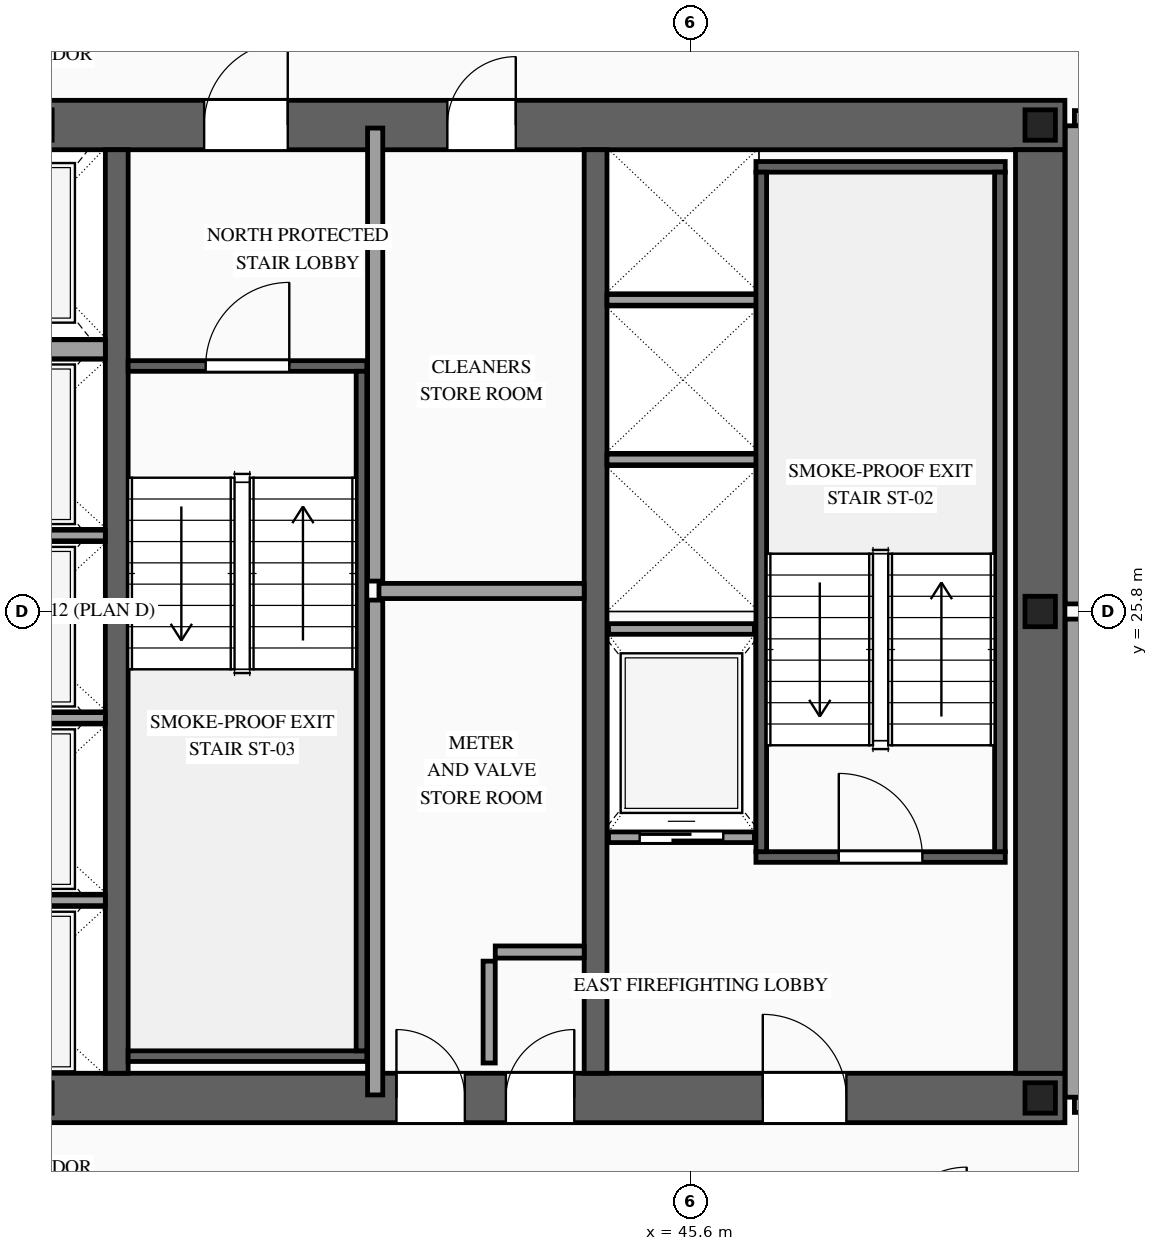
"""IFC4 building model, lengths in metres.
Left out: names, types, materials, properties, quantities, classifications, styles, units other than length and angle.
Written with IfcOpenShell. Run it as: python <this file> out.ifc"""

import sys

from ifc_helpers import new_model, si_unit, direction, frame, frame_2d, origin, origin_2d, place, context, subcontext, project, spatial, rectangle, i_section, extrude, source, transform, mapped, element, fill, save


model = new_model("IFC4")
c1 = context("Model", 3, precision=1e-05, world=origin(), true_north=direction((0.0, 1.0)))
c2 = subcontext(c1, "Body", "Model", "MODEL_VIEW")
j1 = project(units=[si_unit("LENGTHUNIT", "METRE"), si_unit("PLANEANGLEUNIT", "RADIAN")], contexts=[c1])
p1 = place(None, origin())
s1 = spatial("IfcSite", under=j1, at=p1, CompositionType="ELEMENT")
p2 = place(p1, origin())
s2 = spatial("IfcBuilding", under=s1, at=p2, CompositionType="ELEMENT")
p3 = place(p2, frame((0.0, 0.0, 216.0)))
s3 = spatial("IfcBuildingStorey", under=s2, at=p3, CompositionType="ELEMENT", Elevation=216.0)
p4 = place(p3, frame((23.475, 19.4, 0.0), z_axis=(0.0, 0.0, 1.0), x_axis=(1.0, 0.0, 0.0)))
e1 = element("IfcWall", 1, at=p4, inside=s3, PredefinedType="SHEAR", context=c2, shape_type="SweptSolid", body=[
    extrude(rectangle(XDim=27.05, YDim=0.65, at=frame_2d((13.525, 0.0))), origin(), (0.0, 0.0, 1.0), 3.5),
])
p5 = place(p4, frame((1.975, 0.0, 0.0)))
e2 = element("IfcOpeningElement", 2, at=p5, cuts=e1, PredefinedType="OPENING", context=c2, shape_type="SweptSolid", body=[
    extrude(rectangle(XDim=1.1, YDim=2.2, at=frame_2d((0.55, 1.1))), frame((0.0, 0.34, 0.0), z_axis=(0.0, -1.0, 0.0), x_axis=(1.0, 0.0, 0.0)), (0.0, 0.0, 1.0), 0.68),
])
p6 = place(p4, frame((9.875, 0.0, 0.0)))
e3 = element("IfcOpeningElement", 3, at=p6, cuts=e1, PredefinedType="OPENING", context=c2, shape_type="SweptSolid", body=[
    extrude(rectangle(XDim=1.1, YDim=2.2, at=frame_2d((0.55, 1.1))), frame((0.0, 0.34, 0.0), z_axis=(0.0, -1.0, 0.0), x_axis=(1.0, 0.0, 0.0)), (0.0, 0.0, 1.0), 0.68),
])
p7 = place(p4, frame((23.075, 0.0, 0.0)))
e4 = element("IfcOpeningElement", 4, at=p7, cuts=e1, PredefinedType="OPENING", context=c2, shape_type="SweptSolid", body=[
    extrude(rectangle(XDim=1.1, YDim=2.2, at=frame_2d((0.55, 1.1))), frame((0.0, 0.34, 0.0), z_axis=(0.0, -1.0, 0.0), x_axis=(1.0, 0.0, 0.0)), (0.0, 0.0, 1.0), 0.68),
])
p8 = place(p4, frame((19.695, 0.0, 0.0)))
e5 = element("IfcOpeningElement", 5, at=p8, cuts=e1, PredefinedType="OPENING", context=c2, shape_type="SweptSolid", body=[
    extrude(rectangle(XDim=0.9, YDim=2.15, at=frame_2d((0.45, 1.075))), frame((0.0, 0.34, 0.0), z_axis=(0.0, -1.0, 0.0), x_axis=(1.0, 0.0, 0.0)), (0.0, 0.0, 1.0), 0.68),
])
p9 = place(p4, frame((18.255, 0.0, 0.0)))
e6 = element("IfcOpeningElement", 6, at=p9, cuts=e1, PredefinedType="OPENING", context=c2, shape_type="SweptSolid", body=[
    extrude(rectangle(XDim=0.9, YDim=2.15, at=frame_2d((0.45, 1.075))), frame((0.0, 0.34, 0.0), z_axis=(0.0, -1.0, 0.0), x_axis=(1.0, 0.0, 0.0)), (0.0, 0.0, 1.0), 0.68),
])
p10 = place(p3, frame((23.475, 32.2, 0.0), z_axis=(0.0, 0.0, 1.0), x_axis=(1.0, 0.0, 0.0)))
e7 = element("IfcWall", 7, at=p10, inside=s3, PredefinedType="SHEAR", context=c2, shape_type="SweptSolid", body=[
    extrude(rectangle(XDim=27.05, YDim=0.65, at=frame_2d((13.525, 0.0))), origin(), (0.0, 0.0, 1.0), 3.5),
])
p11 = place(p10, frame((4.595, 0.0, 0.0)))
e8 = element("IfcOpeningElement", 8, at=p11, cuts=e7, PredefinedType="OPENING", context=c2, shape_type="SweptSolid", body=[
    extrude(rectangle(XDim=0.9, YDim=2.15, at=frame_2d((0.45, 1.075))), frame((0.0, 0.34, 0.0), z_axis=(0.0, -1.0, 0.0), x_axis=(1.0, 0.0, 0.0)), (0.0, 0.0, 1.0), 0.68),
])
p12 = place(p10, frame((9.875, 0.0, 0.0)))
e9 = element("IfcOpeningElement", 9, at=p12, cuts=e7, PredefinedType="OPENING", context=c2, shape_type="SweptSolid", body=[
    extrude(rectangle(XDim=1.1, YDim=2.2, at=frame_2d((0.55, 1.1))), frame((0.0, 0.34, 0.0), z_axis=(0.0, -1.0, 0.0), x_axis=(1.0, 0.0, 0.0)), (0.0, 0.0, 1.0), 0.68),
])
p13 = place(p10, frame((15.725, 0.0, 0.0)))
e10 = element("IfcOpeningElement", 10, at=p13, cuts=e7, PredefinedType="OPENING", context=c2, shape_type="SweptSolid", body=[
    extrude(rectangle(XDim=1.1, YDim=2.2, at=frame_2d((0.55, 1.1))), frame((0.0, 0.34, 0.0), z_axis=(0.0, -1.0, 0.0), x_axis=(1.0, 0.0, 0.0)), (0.0, 0.0, 1.0), 0.68),
])
p14 = place(p10, frame((18.925, 0.0, 0.0)))
e11 = element("IfcOpeningElement", 11, at=p14, cuts=e7, PredefinedType="OPENING", context=c2, shape_type="SweptSolid", body=[
    extrude(rectangle(XDim=0.9, YDim=2.15, at=frame_2d((0.45, 1.075))), frame((0.0, 0.34, 0.0), z_axis=(0.0, -1.0, 0.0), x_axis=(1.0, 0.0, 0.0)), (0.0, 0.0, 1.0), 0.68),
])
m1 = source(origin(), c2, "Body", "SweptSolid", [
    extrude(rectangle(XDim=12.15, YDim=0.65, at=frame_2d((6.075, 0.0))), origin(), (0.0, 0.0, 1.0), 3.5),
])
p15 = place(p3, frame((50.2, 19.725, 0.0), z_axis=(0.0, 0.0, 1.0), x_axis=(0.0, 1.0, 0.0)))
e12 = element("IfcWall", 12, at=p15, inside=s3, PredefinedType="SHEAR", context=c2, shape_type="MappedRepresentation", body=[
    mapped(m1, transform((0.0, 0.0, 0.0), scale=1.0)),
])
m2 = source(origin(), c2, "Body", "SweptSolid", [
    extrude(rectangle(XDim=12.15, YDim=0.3, at=frame_2d((6.075, 0.0))), origin(), (0.0, 0.0, 1.0), 3.5),
])
for number, where, z_axis, x_axis in (
    (13, (38.05, 19.725, 0.0), (0.0, 0.0, 1.0), (0.0, 1.0, 0.0)),
    (14, (44.35, 19.725, 0.0), (0.0, 0.0, 1.0), (0.0, 1.0, 0.0)),
):
    element("IfcWall", number, at=place(p3, frame(where, z_axis=z_axis, x_axis=x_axis)), inside=s3, PredefinedType="SOLIDWALL", context=c2, shape_type="MappedRepresentation", body=[
        mapped(m2, transform((0.0, 0.0, 0.0), scale=1.0)),
    ])
m3 = source(origin(), c2, "Body", "SweptSolid", [
    extrude(i_section(OverallWidth=0.4, OverallDepth=0.4, WebThickness=0.013, FlangeThickness=0.021, at=origin_2d()), origin(), (0.0, 0.0, 1.0), 3.5),
])
for number, where, z_axis, x_axis in (
    (15, (50.2, 19.4, 0.0), (0.0, 0.0, 1.0), (1.0, 0.0, 0.0)),
    (16, (50.2, 25.8, 0.0), (0.0, 0.0, 1.0), (1.0, 0.0, 0.0)),
    (17, (50.2, 32.2, 0.0), (0.0, 0.0, 1.0), (1.0, 0.0, 0.0)),
):
    element("IfcColumn", number, at=place(p3, frame(where, z_axis=z_axis, x_axis=x_axis)), inside=s3, PredefinedType="COLUMN", context=c2, shape_type="MappedRepresentation", body=[
        mapped(m3, transform((0.0, 0.0, 0.0), scale=1.0)),
    ])
p16 = place(p3, frame((44.52, 22.83, 0.0), z_axis=(0.0, 0.0, 1.0), x_axis=(1.0, 0.0, 0.0)))
e18 = element("IfcWall", 18, at=p16, inside=s3, PredefinedType="SOLIDWALL", context=c2, shape_type="SweptSolid", body=[
    extrude(rectangle(XDim=1.92, YDim=0.14, at=frame_2d((0.96, 0.0))), origin(), (0.0, 0.0, 1.0), 3.22),
])
p17 = place(p16, frame((0.41, 0.0, 0.0)))
e19 = element("IfcOpeningElement", 19, at=p17, cuts=e18, PredefinedType="OPENING", context=c2, shape_type="SweptSolid", body=[
    extrude(rectangle(XDim=1.1, YDim=2.2, at=frame_2d((0.55, 1.1))), frame((0.0, 0.085, 0.0), z_axis=(0.0, -1.0, 0.0), x_axis=(1.0, 0.0, 0.0)), (0.0, 0.0, 1.0), 0.17),
])
m4 = source(origin(), c2, "Body", "SweptSolid", [
    extrude(rectangle(XDim=1.92, YDim=0.14, at=frame_2d((0.96, 0.0))), origin(), (0.0, 0.0, 1.0), 3.22),
])
p18 = place(p3, frame((44.52, 25.57, 0.0), z_axis=(0.0, 0.0, 1.0), x_axis=(1.0, 0.0, 0.0)))
e20 = element("IfcWall", 20, at=p18, inside=s3, PredefinedType="SOLIDWALL", context=c2, shape_type="MappedRepresentation", body=[
    mapped(m4, transform((0.0, 0.0, 0.0), scale=1.0)),
])
m5 = source(origin(), c2, "Body", "SweptSolid", [
    extrude(rectangle(XDim=2.4, YDim=0.14, at=frame_2d((1.2, 0.0))), origin(), (0.0, 0.0, 1.0), 3.22),
])
for number, where, z_axis, x_axis in (
    (21, (35.5, 22.0, 0.0), (0.0, 0.0, 1.0), (1.0, 0.0, 0.0)),
    (22, (35.5, 24.4, 0.0), (0.0, 0.0, 1.0), (1.0, 0.0, 0.0)),
    (23, (35.5, 26.8, 0.0), (0.0, 0.0, 1.0), (1.0, 0.0, 0.0)),
):
    element("IfcWall", number, at=place(p3, frame(where, z_axis=z_axis, x_axis=x_axis)), inside=s3, PredefinedType="SOLIDWALL", context=c2, shape_type="MappedRepresentation", body=[
        mapped(m5, transform((0.0, 0.0, 0.0), scale=1.0)),
    ])
m6 = source(origin(), c2, "Body", "SweptSolid", [
    extrude(rectangle(XDim=2.4, YDim=0.25, at=frame_2d((1.2, 0.0))), origin(), (0.0, 0.0, 1.0), 3.22),
])
p19 = place(p3, frame((35.5, 29.25, 0.0), z_axis=(0.0, 0.0, 1.0), x_axis=(1.0, 0.0, 0.0)))
e24 = element("IfcWall", 24, at=p19, inside=s3, PredefinedType="SOLIDWALL", context=c2, shape_type="MappedRepresentation", body=[
    mapped(m6, transform((0.0, 0.0, 0.0), scale=1.0)),
])
m7 = source(origin(), c2, "Body", "SweptSolid", [
    extrude(rectangle(XDim=2.0, YDim=0.14, at=frame_2d((1.0, 0.0))), origin(), (0.0, 0.0, 1.0), 3.22),
])
for number, where, z_axis, x_axis in (
    (25, (44.5, 27.8, 0.0), (0.0, 0.0, 1.0), (1.0, 0.0, 0.0)),
    (26, (44.5, 29.9, 0.0), (0.0, 0.0, 1.0), (1.0, 0.0, 0.0)),
):
    element("IfcWall", number, at=place(p3, frame(where, z_axis=z_axis, x_axis=x_axis)), inside=s3, PredefinedType="SOLIDWALL", context=c2, shape_type="MappedRepresentation", body=[
        mapped(m7, transform((0.0, 0.0, 0.0), scale=1.0)),
    ])
p20 = place(p3, frame((46.46, 22.57, 0.0), z_axis=(0.0, 0.0, 1.0), x_axis=(1.0, 0.0, 0.0)))
e27 = element("IfcWall", 27, at=p20, inside=s3, PredefinedType="SOLIDWALL", context=c2, shape_type="SweptSolid", body=[
    extrude(rectangle(XDim=3.28, YDim=0.14, at=frame_2d((1.64, 0.0))), origin(), (0.0, 0.0, 1.0), 3.22),
])
p21 = place(p20, frame((1.09, 0.0, 0.0)))
e28 = element("IfcOpeningElement", 28, at=p21, cuts=e27, PredefinedType="OPENING", context=c2, shape_type="SweptSolid", body=[
    extrude(rectangle(XDim=1.1, YDim=2.2, at=frame_2d((0.55, 1.1))), frame((0.0, 0.085, 0.0), z_axis=(0.0, -1.0, 0.0), x_axis=(1.0, 0.0, 0.0)), (0.0, 0.0, 1.0), 0.17),
])
m8 = source(origin(), c2, "Body", "SweptSolid", [
    extrude(rectangle(XDim=3.28, YDim=0.14, at=frame_2d((1.64, 0.0))), origin(), (0.0, 0.0, 1.0), 3.22),
])
p22 = place(p3, frame((46.46, 31.65, 0.0), z_axis=(0.0, 0.0, 1.0), x_axis=(1.0, 0.0, 0.0)))
e29 = element("IfcWall", 29, at=p22, inside=s3, PredefinedType="SOLIDWALL", context=c2, shape_type="MappedRepresentation", body=[
    mapped(m8, transform((0.0, 0.0, 0.0), scale=1.0)),
])
m9 = source(origin(), c2, "Body", "SweptSolid", [
    extrude(rectangle(XDim=8.94, YDim=0.14, at=frame_2d((4.47, 0.0))), origin(), (0.0, 0.0, 1.0), 3.22),
])
for number, where, z_axis, x_axis in (
    (30, (46.53, 22.64, 0.0), (0.0, 0.0, 1.0), (0.0, 1.0, 0.0)),
    (31, (49.67, 22.64, 0.0), (0.0, 0.0, 1.0), (0.0, 1.0, 0.0)),
):
    element("IfcWall", number, at=place(p3, frame(where, z_axis=z_axis, x_axis=x_axis)), inside=s3, PredefinedType="SOLIDWALL", context=c2, shape_type="MappedRepresentation", body=[
        mapped(m9, transform((0.0, 0.0, 0.0), scale=1.0)),
    ])
p23 = place(p3, frame((38.2, 29.03, 0.0), z_axis=(0.0, 0.0, 1.0), x_axis=(1.0, 0.0, 0.0)))
e32 = element("IfcWall", 32, at=p23, inside=s3, PredefinedType="SOLIDWALL", context=c2, shape_type="SweptSolid", body=[
    extrude(rectangle(XDim=3.14, YDim=0.14, at=frame_2d((1.57, 0.0))), origin(), (0.0, 0.0, 1.0), 3.22),
])
p24 = place(p23, frame((1.02, 0.0, 0.0)))
e33 = element("IfcOpeningElement", 33, at=p24, cuts=e32, PredefinedType="OPENING", context=c2, shape_type="SweptSolid", body=[
    extrude(rectangle(XDim=1.1, YDim=2.2, at=frame_2d((0.55, 1.1))), frame((0.0, 0.085, 0.0), z_axis=(0.0, -1.0, 0.0), x_axis=(1.0, 0.0, 0.0)), (0.0, 0.0, 1.0), 0.17),
])
m10 = source(origin(), c2, "Body", "SweptSolid", [
    extrude(rectangle(XDim=3.14, YDim=0.14, at=frame_2d((1.57, 0.0))), origin(), (0.0, 0.0, 1.0), 3.22),
])
p25 = place(p3, frame((38.2, 19.95, 0.0), z_axis=(0.0, 0.0, 1.0), x_axis=(1.0, 0.0, 0.0)))
e34 = element("IfcWall", 34, at=p25, inside=s3, PredefinedType="SOLIDWALL", context=c2, shape_type="MappedRepresentation", body=[
    mapped(m10, transform((0.0, 0.0, 0.0), scale=1.0)),
])
m11 = source(origin(), c2, "Body", "SweptSolid", [
    extrude(rectangle(XDim=8.94, YDim=0.14, at=frame_2d((4.47, 0.0))), origin(), (0.0, 0.0, 1.0), 3.22),
])
p26 = place(p3, frame((41.27, 20.02, 0.0), z_axis=(0.0, 0.0, 1.0), x_axis=(0.0, 1.0, 0.0)))
e35 = element("IfcWall", 35, at=p26, inside=s3, PredefinedType="SOLIDWALL", context=c2, shape_type="MappedRepresentation", body=[
    mapped(m11, transform((0.0, 0.0, 0.0), scale=1.0)),
])
m12 = source(origin(), c2, "Body", "SweptSolid", [
    extrude(rectangle(XDim=1.34, YDim=0.16, at=frame_2d((0.67, 0.0))), origin(), (0.0, 0.0, 1.0), 3.22),
])
p27 = place(p3, frame((42.95, 19.86, 0.0), z_axis=(0.0, 0.0, 1.0), x_axis=(0.0, 1.0, 0.0)))
e36 = element("IfcWall", 36, at=p27, inside=s3, PredefinedType="PARTITIONING", context=c2, shape_type="MappedRepresentation", body=[
    mapped(m12, transform((0.0, 0.0, 0.0), scale=1.0)),
])
m13 = source(origin(), c2, "Body", "SweptSolid", [
    extrude(rectangle(XDim=1.17, YDim=0.16, at=frame_2d((0.585, 0.0))), origin(), (0.0, 0.0, 1.0), 3.22),
])
p28 = place(p3, frame((43.03, 21.32, 0.0), z_axis=(0.0, 0.0, 1.0), x_axis=(1.0, 0.0, 0.0)))
e37 = element("IfcWall", 37, at=p28, inside=s3, PredefinedType="PARTITIONING", context=c2, shape_type="MappedRepresentation", body=[
    mapped(m13, transform((0.0, 0.0, 0.0), scale=1.0)),
])
m14 = source(origin(), c2, "Body", "SweptSolid", [
    extrude(rectangle(XDim=6.51, YDim=0.2, at=frame_2d((3.255, 0.0))), origin(), (0.0, 0.0, 1.0), 3.22),
])
p29 = place(p3, frame((41.45, 19.44, 0.0), z_axis=(0.0, 0.0, 1.0), x_axis=(0.0, 1.0, 0.0)))
e38 = element("IfcWall", 38, at=p29, inside=s3, PredefinedType="PARTITIONING", context=c2, shape_type="MappedRepresentation", body=[
    mapped(m14, transform((0.0, 0.0, 0.0), scale=1.0)),
])
m15 = source(origin(), c2, "Body", "SweptSolid", [
    extrude(rectangle(XDim=2.7, YDim=0.2, at=frame_2d((1.35, 0.0))), origin(), (0.0, 0.0, 1.0), 3.22),
])
p30 = place(p3, frame((41.5, 26.07, 0.0), z_axis=(0.0, 0.0, 1.0), x_axis=(1.0, 0.0, 0.0)))
e39 = element("IfcWall", 39, at=p30, inside=s3, PredefinedType="PARTITIONING", context=c2, shape_type="MappedRepresentation", body=[
    mapped(m15, transform((0.0, 0.0, 0.0), scale=1.0)),
])
m16 = source(origin(), c2, "Body", "SweptSolid", [
    extrude(rectangle(XDim=5.96, YDim=0.2, at=frame_2d((2.98, 0.0))), origin(), (0.0, 0.0, 1.0), 3.22),
])
p31 = place(p3, frame((41.45, 26.2, 0.0), z_axis=(0.0, 0.0, 1.0), x_axis=(0.0, 1.0, 0.0)))
e40 = element("IfcWall", 40, at=p31, inside=s3, PredefinedType="PARTITIONING", context=c2, shape_type="MappedRepresentation", body=[
    mapped(m16, transform((0.0, 0.0, 0.0), scale=1.0)),
])
p32 = place(p3, frame((50.65, 19.31, 0.0), z_axis=(0.0, 0.0, 1.0), x_axis=(1.0, 0.0, 0.0)))
e41 = element("IfcWall", 41, at=p32, inside=s3, PredefinedType="PARTITIONING", context=c2, shape_type="SweptSolid", body=[
    extrude(rectangle(XDim=8.3, YDim=0.2, at=frame_2d((4.15, 0.0))), origin(), (0.0, 0.0, 1.0), 3.22),
])
p33 = place(p32, frame((3.585, 0.0, 0.0)))
e42 = element("IfcOpeningElement", 42, at=p33, cuts=e41, PredefinedType="OPENING", context=c2, shape_type="SweptSolid", body=[
    extrude(rectangle(XDim=1.0, YDim=2.2, at=frame_2d((0.5, 1.1))), frame((0.0, 0.115, 0.0), z_axis=(0.0, -1.0, 0.0), x_axis=(1.0, 0.0, 0.0)), (0.0, 0.0, 1.0), 0.23),
])
m17 = source(origin(), c2, "Body", "SweptSolid", [
    extrude(rectangle(XDim=6.29, YDim=0.2, at=frame_2d((3.145, 0.0))), origin(), (0.0, 0.0, 1.0), 3.22),
])
p34 = place(p3, frame((50.63, 19.41, 0.0), z_axis=(0.0, 0.0, 1.0), x_axis=(0.0, 1.0, 0.0)))
e43 = element("IfcWall", 43, at=p34, inside=s3, PredefinedType="PARTITIONING", context=c2, shape_type="MappedRepresentation", body=[
    mapped(m17, transform((0.0, 0.0, 0.0), scale=1.0)),
])
p35 = place(p3, frame((50.65, 32.29, 0.0), z_axis=(0.0, 0.0, 1.0), x_axis=(1.0, 0.0, 0.0)))
e44 = element("IfcWall", 44, at=p35, inside=s3, PredefinedType="PARTITIONING", context=c2, shape_type="SweptSolid", body=[
    extrude(rectangle(XDim=8.3, YDim=0.2, at=frame_2d((4.15, 0.0))), origin(), (0.0, 0.0, 1.0), 3.22),
])
p36 = place(p35, frame((3.585, 0.0, 0.0)))
e45 = element("IfcOpeningElement", 45, at=p36, cuts=e44, PredefinedType="OPENING", context=c2, shape_type="SweptSolid", body=[
    extrude(rectangle(XDim=1.0, YDim=2.2, at=frame_2d((0.5, 1.1))), frame((0.0, 0.115, 0.0), z_axis=(0.0, -1.0, 0.0), x_axis=(1.0, 0.0, 0.0)), (0.0, 0.0, 1.0), 0.23),
])
p37 = place(p3, frame((50.63, 25.9, 0.0), z_axis=(0.0, 0.0, 1.0), x_axis=(0.0, 1.0, 0.0)))
e46 = element("IfcWall", 46, at=p37, inside=s3, PredefinedType="PARTITIONING", context=c2, shape_type="MappedRepresentation", body=[
    mapped(m17, transform((0.0, 0.0, 0.0), scale=1.0)),
])
m18 = source(origin(), c2, "Body", "SweptSolid", [
    extrude(rectangle(XDim=1.1, YDim=2.2, at=frame_2d((0.55, 1.1))), frame((0.0, 0.025, 0.0), z_axis=(0.0, -1.0, 0.0), x_axis=(1.0, 0.0, 0.0)), (0.0, 0.0, 1.0), 0.05),
])
p38 = place(p17, origin())
e47 = element("IfcDoor", 47, at=p38, inside=s3, OperationType="SLIDING_TO_RIGHT", PredefinedType="DOOR", context=c2, shape_type="MappedRepresentation", body=[
    mapped(m18, transform((0.0, 0.0, 0.0), scale=1.0)),
])
fill(e19, e47)
m19 = source(origin(), c2, "Body", "SweptSolid", [
    extrude(rectangle(XDim=1.1, YDim=2.2, at=frame_2d((0.55, 1.1))), frame((0.0, 0.025, 0.0), z_axis=(0.0, -1.0, 0.0), x_axis=(1.0, 0.0, 0.0)), (0.0, 0.0, 1.0), 0.05),
])
p39 = place(p21, origin())
e48 = element("IfcDoor", 48, at=p39, inside=s3, OperationType="SINGLE_SWING_LEFT", PredefinedType="DOOR", context=c2, shape_type="MappedRepresentation", body=[
    mapped(m19, transform((0.0, 0.0, 0.0), scale=1.0)),
])
fill(e28, e48)
p40 = place(p24, origin())
e49 = element("IfcDoor", 49, at=p40, inside=s3, OperationType="SINGLE_SWING_RIGHT", PredefinedType="DOOR", context=c2, shape_type="MappedRepresentation", body=[
    mapped(m19, transform((0.0, 0.0, 0.0), scale=1.0)),
])
fill(e33, e49)
p41 = place(p7, origin())
e50 = element("IfcDoor", 50, at=p41, inside=s3, OperationType="SINGLE_SWING_LEFT", PredefinedType="DOOR", context=c2, shape_type="MappedRepresentation", body=[
    mapped(m19, transform((0.0, 0.0, 0.0), scale=1.0)),
])
fill(e4, e50)
p42 = place(p13, origin())
e51 = element("IfcDoor", 51, at=p42, inside=s3, OperationType="SINGLE_SWING_RIGHT", PredefinedType="DOOR", context=c2, shape_type="MappedRepresentation", body=[
    mapped(m19, transform((0.0, 0.0, 0.0), scale=1.0)),
])
fill(e10, e51)
m20 = source(origin(), c2, "Body", "SweptSolid", [
    extrude(rectangle(XDim=0.9, YDim=2.15, at=frame_2d((0.45, 1.075))), frame((0.0, 0.025, 0.0), z_axis=(0.0, -1.0, 0.0), x_axis=(1.0, 0.0, 0.0)), (0.0, 0.0, 1.0), 0.05),
])
p43 = place(p8, origin())
e52 = element("IfcDoor", 52, at=p43, inside=s3, OperationType="SINGLE_SWING_RIGHT", PredefinedType="DOOR", context=c2, shape_type="MappedRepresentation", body=[
    mapped(m20, transform((0.0, 0.0, 0.0), scale=1.0)),
])
fill(e5, e52)
p44 = place(p9, origin())
e53 = element("IfcDoor", 53, at=p44, inside=s3, OperationType="SINGLE_SWING_LEFT", PredefinedType="DOOR", context=c2, shape_type="MappedRepresentation", body=[
    mapped(m20, transform((0.0, 0.0, 0.0), scale=1.0)),
])
fill(e6, e53)
p45 = place(p14, origin())
e54 = element("IfcDoor", 54, at=p45, inside=s3, OperationType="SINGLE_SWING_RIGHT", PredefinedType="DOOR", context=c2, shape_type="MappedRepresentation", body=[
    mapped(m20, transform((0.0, 0.0, 0.0), scale=1.0)),
])
fill(e11, e54)
save(model, sys.argv[1])
